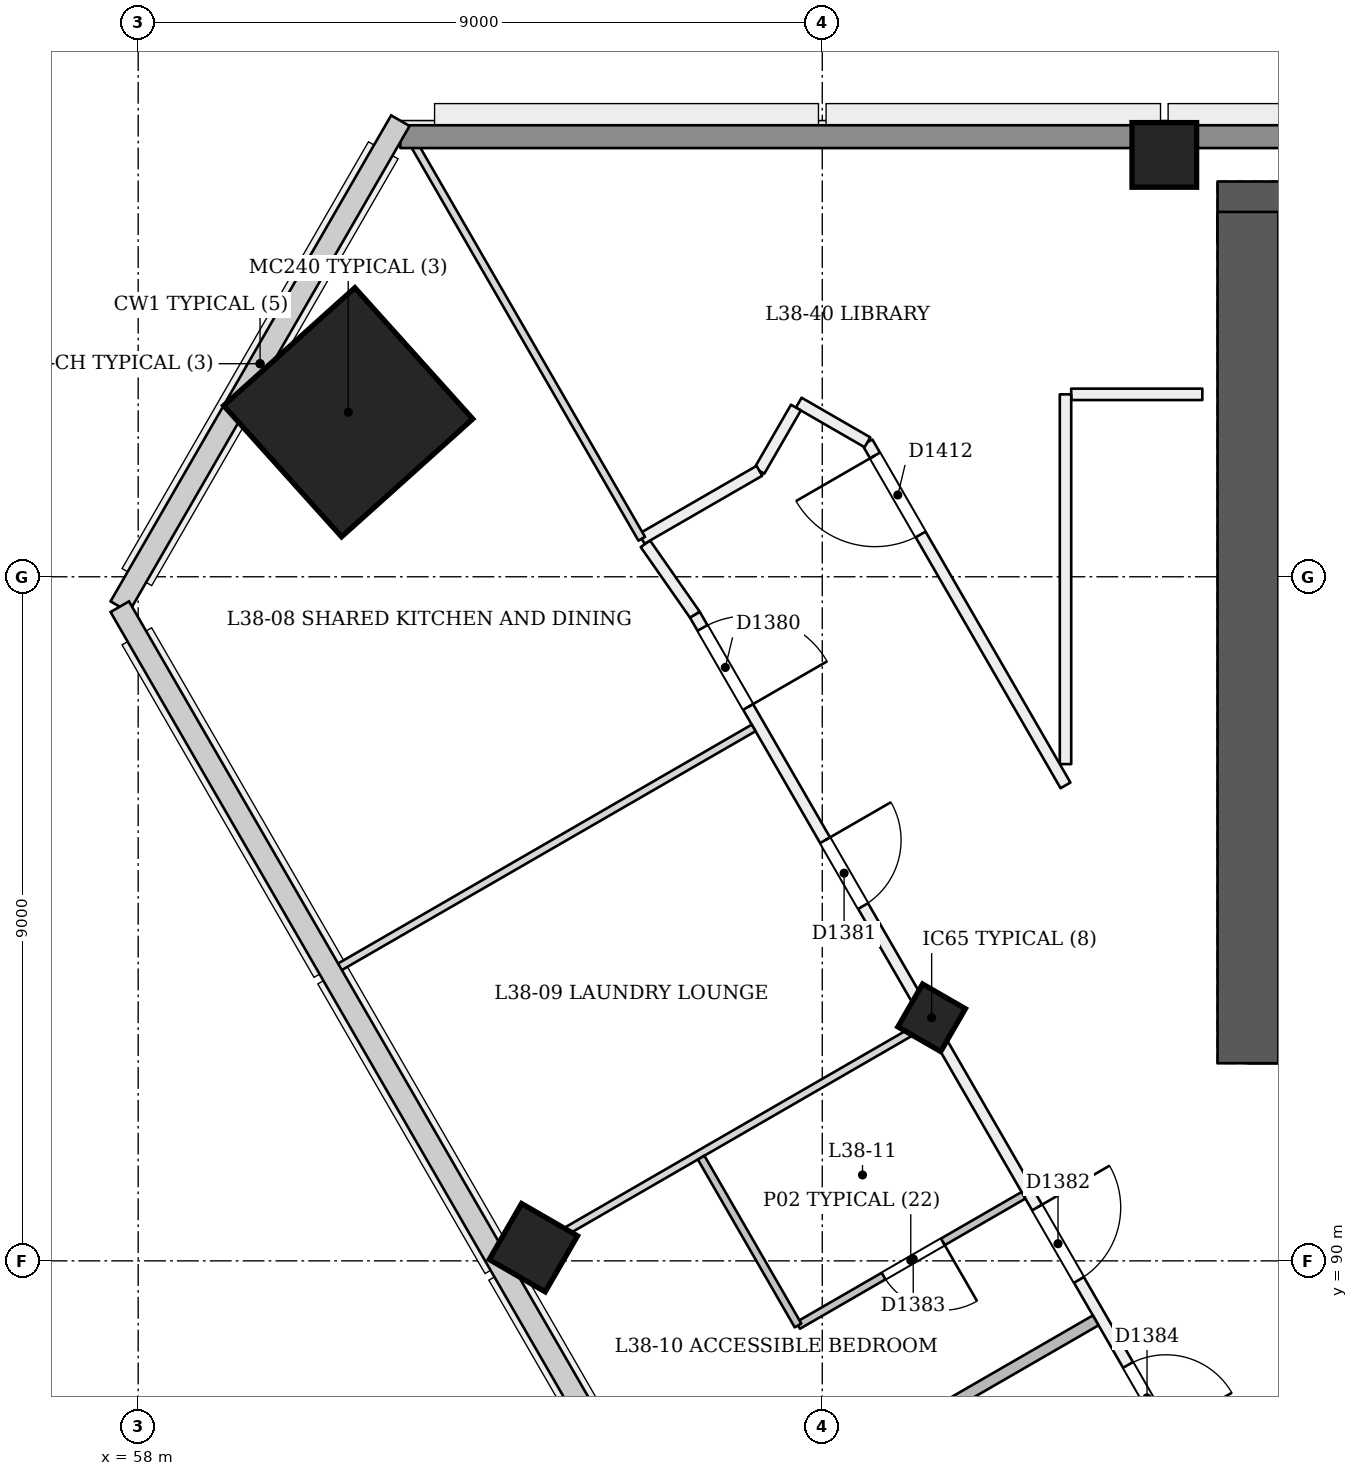
"""IFC4 building model, lengths in metres.
Left out: names, types, materials, properties, quantities, classifications, styles, units other than length and angle.
Written with IfcOpenShell. Run it as: python <this file> out.ifc"""

import sys

from ifc_helpers import new_model, si_unit, direction, frame, frame_2d, origin, origin_2d, place, context, subcontext, project, spatial, rectangle, extrude, element, fill, save


model = new_model("IFC4")
c1 = context("Model", 3, precision=1e-05, world=origin(), true_north=direction((0.0, 1.0)))
c2 = subcontext(c1, "Body", "Model", "MODEL_VIEW")
j1 = project(units=[si_unit("LENGTHUNIT", "METRE"), si_unit("PLANEANGLEUNIT", "RADIAN")], contexts=[c1])
p1 = place(None, origin())
s1 = spatial("IfcSite", under=j1, at=p1, CompositionType="ELEMENT")
p2 = place(p1, origin())
s2 = spatial("IfcBuilding", under=s1, at=p2, CompositionType="ELEMENT")
p3 = place(p2, frame((0.0, 0.0, 149.4)))
s3 = spatial("IfcBuildingStorey", under=s2, at=p3, CompositionType="ELEMENT", Elevation=149.4)
p4 = place(p3, frame((72.6, 93.0, 0.0), z_axis=(0.0, 0.0, 1.0), x_axis=(1.0, 0.0, 0.0)))
e1 = element("IfcWall", 1, at=p4, inside=s3, PredefinedType="SHEAR", context=c2, shape_type="SweptSolid", body=[
    extrude(rectangle(XDim=25.2, YDim=0.8, at=frame_2d((12.6, 0.0))), origin(), (0.0, 0.0, 1.0), 3.6),
])
p5 = place(p4, frame((1.2, 0.0, 0.0)))
e2 = element("IfcOpeningElement", 2, at=p5, cuts=e1, PredefinedType="OPENING", context=c2, shape_type="SweptSolid", body=[
    extrude(rectangle(XDim=1.2, YDim=2.1, at=frame_2d((0.6, 1.05))), frame((0.0, 0.411, 0.0), z_axis=(0.0, -1.0, 0.0), x_axis=(1.0, 0.0, 0.0)), (0.0, 0.0, 1.0), 0.821),
])
p6 = place(p4, frame((3.4, 0.0, 0.0)))
e3 = element("IfcOpeningElement", 3, at=p6, cuts=e1, PredefinedType="OPENING", context=c2, shape_type="SweptSolid", body=[
    extrude(rectangle(XDim=1.2, YDim=2.1, at=frame_2d((0.6, 1.05))), frame((0.0, 0.411, 0.0), z_axis=(0.0, -1.0, 0.0), x_axis=(1.0, 0.0, 0.0)), (0.0, 0.0, 1.0), 0.821),
])
p7 = place(p4, frame((13.4, 0.0, 0.0)))
e4 = element("IfcOpeningElement", 4, at=p7, cuts=e1, PredefinedType="OPENING", context=c2, shape_type="SweptSolid", body=[
    extrude(rectangle(XDim=1.2, YDim=2.1, at=frame_2d((0.6, 1.05))), frame((0.0, 0.411, 0.0), z_axis=(0.0, -1.0, 0.0), x_axis=(1.0, 0.0, 0.0)), (0.0, 0.0, 1.0), 0.821),
])
p8 = place(p4, frame((15.462, 0.0, 0.0)))
e5 = element("IfcOpeningElement", 5, at=p8, cuts=e1, PredefinedType="OPENING", context=c2, shape_type="SweptSolid", body=[
    extrude(rectangle(XDim=1.0, YDim=2.1, at=frame_2d((0.5, 1.05))), frame((0.0, 0.411, 0.0), z_axis=(0.0, -1.0, 0.0), x_axis=(1.0, 0.0, 0.0)), (0.0, 0.0, 1.0), 0.821),
])
p9 = place(p4, frame((17.7, 0.0, 0.0)))
e6 = element("IfcOpeningElement", 6, at=p9, cuts=e1, PredefinedType="OPENING", context=c2, shape_type="SweptSolid", body=[
    extrude(rectangle(XDim=1.0, YDim=2.1, at=frame_2d((0.5, 1.05))), frame((0.0, 0.411, 0.0), z_axis=(0.0, -1.0, 0.0), x_axis=(1.0, 0.0, 0.0)), (0.0, 0.0, 1.0), 0.821),
])
p10 = place(p4, frame((20.25, 0.0, 0.0)))
e7 = element("IfcOpeningElement", 7, at=p10, cuts=e1, PredefinedType="OPENING", context=c2, shape_type="SweptSolid", body=[
    extrude(rectangle(XDim=1.0, YDim=2.1, at=frame_2d((0.5, 1.05))), frame((0.0, 0.411, 0.0), z_axis=(0.0, -1.0, 0.0), x_axis=(1.0, 0.0, 0.0)), (0.0, 0.0, 1.0), 0.821),
])
p11 = place(p4, frame((22.738, 0.0, 0.0)))
e8 = element("IfcOpeningElement", 8, at=p11, cuts=e1, PredefinedType="OPENING", context=c2, shape_type="SweptSolid", body=[
    extrude(rectangle(XDim=1.0, YDim=2.1, at=frame_2d((0.5, 1.05))), frame((0.0, 0.411, 0.0), z_axis=(0.0, -1.0, 0.0), x_axis=(1.0, 0.0, 0.0)), (0.0, 0.0, 1.0), 0.821),
])
p12 = place(p3, frame((97.4, 103.8, 0.0), z_axis=(0.0, 0.0, 1.0), x_axis=(-1.0, 0.0, 0.0)))
e9 = element("IfcWall", 9, at=p12, inside=s3, PredefinedType="SHEAR", context=c2, shape_type="SweptSolid", body=[
    extrude(rectangle(XDim=25.2, YDim=0.8, at=frame_2d((12.6, 0.0))), origin(), (0.0, 0.0, 1.0), 3.6),
])
p13 = place(p3, frame((72.6, 103.8, 0.0), z_axis=(0.0, 0.0, 1.0), x_axis=(0.0, -1.0, 0.0)))
e10 = element("IfcWall", 10, at=p13, inside=s3, PredefinedType="SHEAR", context=c2, shape_type="SweptSolid", body=[
    extrude(rectangle(XDim=11.2, YDim=0.8, at=frame_2d((5.6, 0.0))), origin(), (0.0, 0.0, 1.0), 3.6),
])
p14 = place(p3, frame((68.412, 93.151, -0.02), z_axis=(0.022222852987, 0.038483477124, 0.999012095419), x_axis=(-0.86564204957, -0.499182053359, 0.038485316959)))
e11 = element("IfcColumn", 11, at=p14, inside=s3, PredefinedType="COLUMN", context=c2, shape_type="SweptSolid", body=[
    extrude(rectangle(XDim=0.65, YDim=0.65, at=origin_2d()), origin(), (0.0, 0.0, 1.0), 3.604),
])
p15 = place(p3, frame((60.729, 101.153, 0.0), z_axis=(0.028401814599, 0.009218727412, 0.999554076572), x_axis=(-0.865127421055, 0.501154806977, 0.019960079728)))
e12 = element("IfcColumn", 12, at=p15, inside=s3, PredefinedType="COLUMN", context=c2, shape_type="SweptSolid", body=[
    extrude(rectangle(XDim=2.32, YDim=2.32, at=origin_2d()), origin(), (0.0, 0.0, 1.0), 3.602),
])
p16 = place(p3, frame((71.5, 104.55, 0.0), z_axis=(0.0, 0.0, 1.0), x_axis=(1.0, 0.0, 0.0)))
e13 = element("IfcColumn", 13, at=p16, inside=s3, PredefinedType="COLUMN", context=c2, shape_type="SweptSolid", body=[
    extrude(rectangle(XDim=0.85, YDim=0.85, at=origin_2d()), origin(), (0.0, 0.0, 1.0), 3.6),
])
p17 = place(p3, frame((63.172, 90.126, -0.026), z_axis=(0.02215519141, 0.038415882353, 0.999016199807), x_axis=(-0.865361939077, -0.499673629592, 0.038405446053)))
e14 = element("IfcColumn", 14, at=p17, inside=s3, PredefinedType="COLUMN", context=c2, shape_type="SweptSolid", body=[
    extrude(rectangle(XDim=0.85, YDim=0.85, at=origin_2d()), origin(), (0.0, 0.0, 1.0), 3.604),
])
p18 = place(p3, frame((64.673, 99.434, 0.0), z_axis=(0.0, 0.0, 1.0), x_axis=(0.57223860729, -0.820087176053, 0.0)))
e15 = element("IfcWall", 15, at=p18, inside=s3, PredefinedType="PARTITIONING", context=c2, shape_type="SweptSolid", body=[
    extrude(rectangle(XDim=1.139, YDim=0.15, at=frame_2d((0.569, 0.0))), origin(), (0.0, 0.0, 1.0), 3.15),
])
p19 = place(p3, frame((65.324, 98.5, 0.0), z_axis=(0.0, 0.0, 1.0), x_axis=(0.500001898363, -0.866024307761, 0.0)))
e16 = element("IfcWall", 16, at=p19, inside=s3, PredefinedType="PARTITIONING", context=c2, shape_type="SweptSolid", body=[
    extrude(rectangle(XDim=39.351, YDim=0.15, at=frame_2d((19.675, 0.0))), origin(), (0.0, 0.0, 1.0), 2.75),
])
p20 = place(p19, frame((0.2, 0.0, 0.0)))
e17 = element("IfcOpeningElement", 17, at=p20, cuts=e16, PredefinedType="OPENING", context=c2, shape_type="SweptSolid", body=[
    extrude(rectangle(XDim=1.2, YDim=2.1, at=frame_2d((0.6, 1.05))), frame((0.0, 0.085, 0.0), z_axis=(0.0, -1.0, 0.0), x_axis=(1.0, 0.0, 0.0)), (0.0, 0.0, 1.0), 0.171),
])
p21 = place(p19, frame((3.425, 0.0, 0.0)))
e18 = element("IfcOpeningElement", 18, at=p21, cuts=e16, PredefinedType="OPENING", context=c2, shape_type="SweptSolid", body=[
    extrude(rectangle(XDim=1.0, YDim=2.1, at=frame_2d((0.5, 1.05))), frame((0.0, 0.085, 0.0), z_axis=(0.0, -1.0, 0.0), x_axis=(1.0, 0.0, 0.0)), (0.0, 0.0, 1.0), 0.171),
])
p22 = place(p19, frame((9.004, 0.0, 0.0)))
e19 = element("IfcOpeningElement", 19, at=p22, cuts=e16, PredefinedType="OPENING", context=c2, shape_type="SweptSolid", body=[
    extrude(rectangle(XDim=1.1, YDim=2.1, at=frame_2d((0.55, 1.05))), frame((0.0, 0.085, 0.0), z_axis=(0.0, -1.0, 0.0), x_axis=(1.0, 0.0, 0.0)), (0.0, 0.0, 1.0), 0.171),
])
p23 = place(p19, frame((11.396, 0.0, 0.0)))
e20 = element("IfcOpeningElement", 20, at=p23, cuts=e16, PredefinedType="OPENING", context=c2, shape_type="SweptSolid", body=[
    extrude(rectangle(XDim=1.0, YDim=2.1, at=frame_2d((0.5, 1.05))), frame((0.0, 0.085, 0.0), z_axis=(0.0, -1.0, 0.0), x_axis=(1.0, 0.0, 0.0)), (0.0, 0.0, 1.0), 0.171),
])
p24 = place(p19, frame((17.955, 0.0, 0.0)))
e21 = element("IfcOpeningElement", 21, at=p24, cuts=e16, PredefinedType="OPENING", context=c2, shape_type="SweptSolid", body=[
    extrude(rectangle(XDim=1.0, YDim=2.1, at=frame_2d((0.5, 1.05))), frame((0.0, 0.085, 0.0), z_axis=(0.0, -1.0, 0.0), x_axis=(1.0, 0.0, 0.0)), (0.0, 0.0, 1.0), 0.171),
])
p25 = place(p19, frame((20.396, 0.0, 0.0)))
e22 = element("IfcOpeningElement", 22, at=p25, cuts=e16, PredefinedType="OPENING", context=c2, shape_type="SweptSolid", body=[
    extrude(rectangle(XDim=1.0, YDim=2.1, at=frame_2d((0.5, 1.05))), frame((0.0, 0.085, 0.0), z_axis=(0.0, -1.0, 0.0), x_axis=(1.0, 0.0, 0.0)), (0.0, 0.0, 1.0), 0.171),
])
p26 = place(p19, frame((26.955, 0.0, 0.0)))
e23 = element("IfcOpeningElement", 23, at=p26, cuts=e16, PredefinedType="OPENING", context=c2, shape_type="SweptSolid", body=[
    extrude(rectangle(XDim=1.0, YDim=2.1, at=frame_2d((0.5, 1.05))), frame((0.0, 0.085, 0.0), z_axis=(0.0, -1.0, 0.0), x_axis=(1.0, 0.0, 0.0)), (0.0, 0.0, 1.0), 0.171),
])
p27 = place(p19, frame((29.396, 0.0, 0.0)))
e24 = element("IfcOpeningElement", 24, at=p27, cuts=e16, PredefinedType="OPENING", context=c2, shape_type="SweptSolid", body=[
    extrude(rectangle(XDim=1.0, YDim=2.1, at=frame_2d((0.5, 1.05))), frame((0.0, 0.085, 0.0), z_axis=(0.0, -1.0, 0.0), x_axis=(1.0, 0.0, 0.0)), (0.0, 0.0, 1.0), 0.171),
])
p28 = place(p19, frame((36.004, 0.0, 0.0)))
e25 = element("IfcOpeningElement", 25, at=p28, cuts=e16, PredefinedType="OPENING", context=c2, shape_type="SweptSolid", body=[
    extrude(rectangle(XDim=1.1, YDim=2.1, at=frame_2d((0.55, 1.05))), frame((0.0, 0.085, 0.0), z_axis=(0.0, -1.0, 0.0), x_axis=(1.0, 0.0, 0.0)), (0.0, 0.0, 1.0), 0.171),
])
p29 = place(p3, frame((72.0, 101.4, 0.0), z_axis=(0.0, 0.0, 1.0), x_axis=(-1.0, 0.0, 0.0)))
e26 = element("IfcWall", 26, at=p29, inside=s3, PredefinedType="PARTITIONING", context=c2, shape_type="SweptSolid", body=[
    extrude(rectangle(XDim=1.725, YDim=0.15, at=frame_2d((0.863, 0.0))), origin(), (0.0, 0.0, 1.0), 3.15),
])
p30 = place(p3, frame((70.2, 101.4, 0.0), z_axis=(0.0, 0.0, 1.0), x_axis=(0.0, -1.0, 0.0)))
e27 = element("IfcWall", 27, at=p30, inside=s3, PredefinedType="PARTITIONING", context=c2, shape_type="SweptSolid", body=[
    extrude(rectangle(XDim=4.865, YDim=0.15, at=frame_2d((2.432, 0.0))), origin(), (0.0, 0.0, 1.0), 3.15),
])
p31 = place(p3, frame((70.2, 96.255, 0.0), z_axis=(0.0, 0.0, 1.0), x_axis=(-0.499977898262, 0.866038163853, 0.0)))
e28 = element("IfcWall", 28, at=p31, inside=s3, PredefinedType="PARTITIONING", context=c2, shape_type="SweptSolid", body=[
    extrude(rectangle(XDim=5.212, YDim=0.15, at=frame_2d((2.606, 0.0))), origin(), (0.0, 0.0, 1.0), 3.15),
])
p32 = place(p31, frame((3.812, 0.0, 0.0)))
e29 = element("IfcOpeningElement", 29, at=p32, cuts=e28, PredefinedType="OPENING", context=c2, shape_type="SweptSolid", body=[
    extrude(rectangle(XDim=1.2, YDim=2.1, at=frame_2d((0.6, 1.05))), frame((0.0, 0.085, 0.0), z_axis=(0.0, -1.0, 0.0), x_axis=(1.0, 0.0, 0.0)), (0.0, 0.0, 1.0), 0.171),
])
p33 = place(p3, frame((67.594, 100.769, 0.0), z_axis=(0.0, 0.0, 1.0), x_axis=(-0.866045268016, 0.499965592563, 0.0)))
e30 = element("IfcWall", 30, at=p33, inside=s3, PredefinedType="PARTITIONING", context=c2, shape_type="SweptSolid", body=[
    extrude(rectangle(XDim=1.043, YDim=0.15, at=frame_2d((0.521, 0.0))), origin(), (0.0, 0.0, 1.0), 3.15),
])
p34 = place(p3, frame((66.653, 101.226, 0.0), z_axis=(0.0, 0.0, 1.0), x_axis=(-0.500074377092, -0.865982457891, 0.0)))
e31 = element("IfcWall", 31, at=p34, inside=s3, PredefinedType="PARTITIONING", context=c2, shape_type="SweptSolid", body=[
    extrude(rectangle(XDim=0.961, YDim=0.15, at=frame_2d((0.48, 0.0))), origin(), (0.0, 0.0, 1.0), 3.15),
])
p35 = place(p3, frame((66.173, 100.394, 0.0), z_axis=(0.0, 0.0, 1.0), x_axis=(-0.866024106094, -0.50000224766, 0.0)))
e32 = element("IfcWall", 32, at=p35, inside=s3, PredefinedType="PARTITIONING", context=c2, shape_type="SweptSolid", body=[
    extrude(rectangle(XDim=1.788, YDim=0.15, at=frame_2d((0.894, 0.0))), origin(), (0.0, 0.0, 1.0), 3.15),
])
p36 = place(p3, frame((60.602, 93.839, 0.0), z_axis=(0.0, 0.0, 1.0), x_axis=(0.866025401434, 0.500000004071, 0.0)))
e33 = element("IfcWall", 33, at=p36, inside=s3, PredefinedType="PARTITIONING", context=c2, shape_type="SweptSolid", body=[
    extrude(rectangle(XDim=6.345, YDim=0.1, at=frame_2d((3.173, 0.0))), origin(), (0.0, 0.0, 1.0), 2.65),
])
p37 = place(p3, frame((64.625, 99.5, 0.0), z_axis=(0.0, 0.0, 1.0), x_axis=(-0.500004896655, 0.866022576681, 0.0)))
e34 = element("IfcWall", 34, at=p37, inside=s3, PredefinedType="PARTITIONING", context=c2, shape_type="SweptSolid", body=[
    extrude(rectangle(XDim=6.235, YDim=0.1, at=frame_2d((3.118, 0.0))), origin(), (0.0, 0.0, 1.0), 2.65),
])
p38 = place(p3, frame((62.87, 89.952, 0.0), z_axis=(0.0, 0.0, 1.0), x_axis=(0.866025537322, 0.499999768706, 0.0)))
e35 = element("IfcWall", 35, at=p38, inside=s3, PredefinedType="PARTITIONING", context=c2, shape_type="SweptSolid", body=[
    extrude(rectangle(XDim=6.325, YDim=0.1, at=frame_2d((3.163, 0.0))), origin(), (0.0, 0.0, 1.0), 2.65),
])
p39 = place(p3, frame((69.647, 90.863, 0.0), z_axis=(0.0, 0.0, 1.0), x_axis=(-0.866001587311, -0.500041249073, 0.0)))
e36 = element("IfcWall", 36, at=p39, inside=s3, PredefinedType="PARTITIONING", context=c2, shape_type="SweptSolid", body=[
    extrude(rectangle(XDim=3.425, YDim=0.1, at=frame_2d((1.712, 0.0))), origin(), (0.0, 0.0, 1.0), 3.15),
])
p40 = place(p39, frame((1.225, 0.0, 0.0)))
e37 = element("IfcOpeningElement", 37, at=p40, cuts=e36, PredefinedType="OPENING", context=c2, shape_type="SweptSolid", body=[
    extrude(rectangle(XDim=0.9, YDim=2.1, at=frame_2d((0.45, 1.05))), frame((0.0, 0.061, 0.0), z_axis=(0.0, -1.0, 0.0), x_axis=(1.0, 0.0, 0.0)), (0.0, 0.0, 1.0), 0.121),
])
p41 = place(p3, frame((66.681, 89.15, 0.0), z_axis=(0.0, 0.0, 1.0), x_axis=(-0.499948979701, 0.866054858364, 0.0)))
e38 = element("IfcWall", 38, at=p41, inside=s3, PredefinedType="PARTITIONING", context=c2, shape_type="SweptSolid", body=[
    extrude(rectangle(XDim=2.55, YDim=0.1, at=frame_2d((1.275, 0.0))), origin(), (0.0, 0.0, 1.0), 2.75),
])
p42 = place(p3, frame((65.102, 86.045, 0.0), z_axis=(0.0, 0.0, 1.0), x_axis=(0.866025401434, 0.500000004071, 0.0)))
e39 = element("IfcWall", 39, at=p42, inside=s3, PredefinedType="PARTITIONING", context=c2, shape_type="SweptSolid", body=[
    extrude(rectangle(XDim=6.345, YDim=0.15, at=frame_2d((3.173, 0.0))), origin(), (0.0, 0.0, 1.0), 2.65),
])
p43 = place(p3, frame((61.449, 104.79, 0.0), z_axis=(0.0, 0.0, 1.0), x_axis=(1.0, 0.0, 0.0)))
e40 = element("IfcWall", 40, at=p43, inside=s3, PredefinedType="SOLIDWALL", context=c2, shape_type="SweptSolid", body=[
    extrude(rectangle(XDim=47.102, YDim=0.3, at=frame_2d((23.551, 0.0))), origin(), (0.0, 0.0, 1.0), 2.65),
])
p44 = place(p20, origin())
e41 = element("IfcDoor", 41, at=p44, inside=s3, OperationType="SINGLE_SWING_RIGHT", PredefinedType="NOTDEFINED", context=c2, shape_type="SweptSolid", body=[
    extrude(rectangle(XDim=1.2, YDim=2.1, at=frame_2d((0.6, 1.05))), frame((0.0, 0.025, 0.0), z_axis=(0.0, -1.0, 0.0), x_axis=(1.0, 0.0, 0.0)), (0.0, 0.0, 1.0), 0.05),
])
fill(e17, e41)
p45 = place(p21, origin())
e42 = element("IfcDoor", 42, at=p45, inside=s3, OperationType="SINGLE_SWING_LEFT", PredefinedType="NOTDEFINED", context=c2, shape_type="SweptSolid", body=[
    extrude(rectangle(XDim=1.0, YDim=2.1, at=frame_2d((0.5, 1.05))), frame((0.0, 0.025, 0.0), z_axis=(0.0, -1.0, 0.0), x_axis=(1.0, 0.0, 0.0)), (0.0, 0.0, 1.0), 0.05),
])
fill(e18, e42)
p46 = place(p22, origin())
e43 = element("IfcDoor", 43, at=p46, inside=s3, OperationType="SINGLE_SWING_LEFT", PredefinedType="NOTDEFINED", context=c2, shape_type="SweptSolid", body=[
    extrude(rectangle(XDim=1.1, YDim=2.1, at=frame_2d((0.55, 1.05))), frame((0.0, 0.025, 0.0), z_axis=(0.0, -1.0, 0.0), x_axis=(1.0, 0.0, 0.0)), (0.0, 0.0, 1.0), 0.05),
])
fill(e19, e43)
p47 = place(p40, origin())
e44 = element("IfcDoor", 44, at=p47, inside=s3, OperationType="SINGLE_SWING_LEFT", PredefinedType="NOTDEFINED", context=c2, shape_type="SweptSolid", body=[
    extrude(rectangle(XDim=0.9, YDim=2.1, at=frame_2d((0.45, 1.05))), frame((0.0, 0.025, 0.0), z_axis=(0.0, -1.0, 0.0), x_axis=(1.0, 0.0, 0.0)), (0.0, 0.0, 1.0), 0.05),
])
fill(e37, e44)
p48 = place(p23, origin())
e45 = element("IfcDoor", 45, at=p48, inside=s3, OperationType="SINGLE_SWING_RIGHT", PredefinedType="NOTDEFINED", context=c2, shape_type="SweptSolid", body=[
    extrude(rectangle(XDim=1.0, YDim=2.1, at=frame_2d((0.5, 1.05))), frame((0.0, 0.025, 0.0), z_axis=(0.0, -1.0, 0.0), x_axis=(1.0, 0.0, 0.0)), (0.0, 0.0, 1.0), 0.05),
])
fill(e20, e45)
p49 = place(p32, origin())
e46 = element("IfcDoor", 46, at=p49, inside=s3, OperationType="SINGLE_SWING_RIGHT", PredefinedType="NOTDEFINED", context=c2, shape_type="SweptSolid", body=[
    extrude(rectangle(XDim=1.2, YDim=2.1, at=frame_2d((0.6, 1.05))), frame((0.0, 0.025, 0.0), z_axis=(0.0, -1.0, 0.0), x_axis=(1.0, 0.0, 0.0)), (0.0, 0.0, 1.0), 0.05),
])
fill(e29, e46)
save(model, sys.argv[1])
